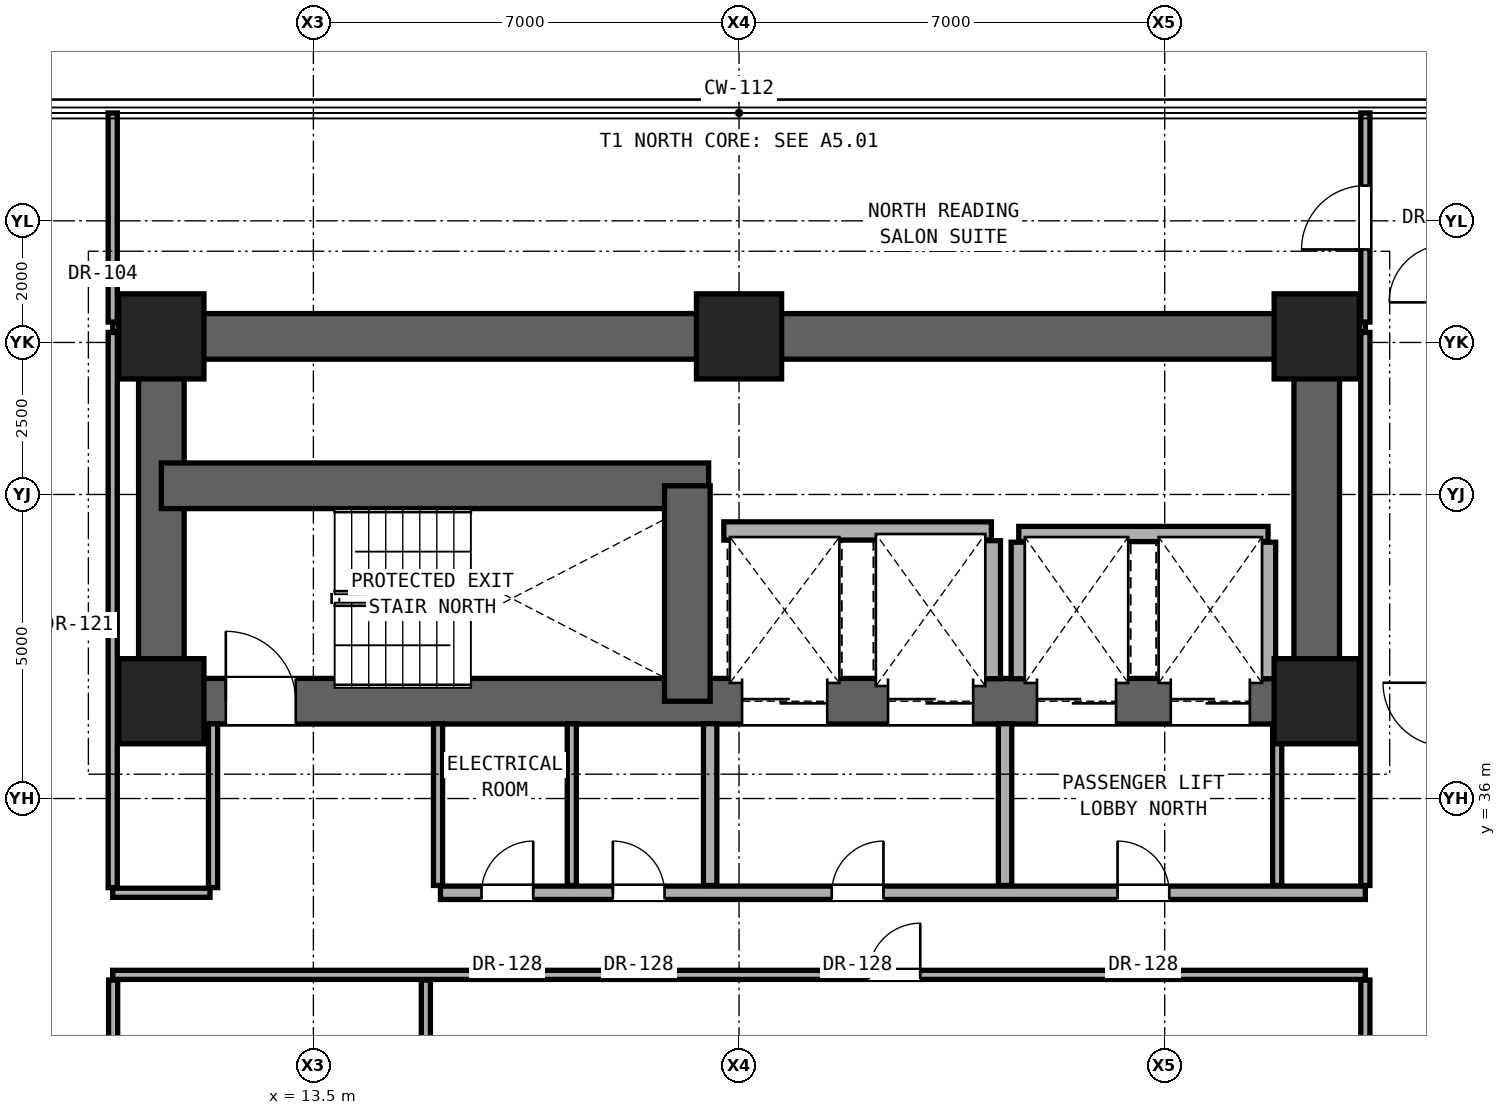
"""IFC4 building model, lengths in metres.
Left out: names, types, materials, properties, quantities, classifications, styles, units other than length and angle.
Written with IfcOpenShell. Run it as: python <this file> out.ifc"""

import sys

from ifc_helpers import new_model, si_unit, direction, frame, frame_2d, origin, origin_2d, place, context, subcontext, project, spatial, rectangle, extrude, element, fill, save


model = new_model("IFC4")
c1 = context("Model", 3, precision=1e-05, world=origin(), true_north=direction((0.0, 1.0)))
c2 = subcontext(c1, "Body", "Model", "MODEL_VIEW")
j1 = project(units=[si_unit("LENGTHUNIT", "METRE"), si_unit("PLANEANGLEUNIT", "RADIAN")], contexts=[c1])
p1 = place(None, origin())
s1 = spatial("IfcSite", under=j1, at=p1, CompositionType="ELEMENT")
p2 = place(p1, origin())
s2 = spatial("IfcBuilding", under=s1, at=p2, CompositionType="ELEMENT")
p3 = place(p2, frame((0.0, 0.0, 32.3)))
s3 = spatial("IfcBuildingStorey", under=s2, at=p3, CompositionType="ELEMENT", Elevation=32.3)
for number, where, z_axis, x_axis in (
    (1, (11.0, 37.6, 0.0), (0.0, 0.0, 1.0), (1.0, 0.0, 0.0)),
    (2, (30.0, 37.6, 0.0), (0.0, 0.0, 1.0), (1.0, 0.0, 0.0)),
    (3, (11.0, 43.6, 0.0), (0.0, 0.0, 1.0), (1.0, 0.0, 0.0)),
    (4, (20.5, 43.6, 0.0), (0.0, 0.0, 1.0), (1.0, 0.0, 0.0)),
    (5, (30.0, 43.6, 0.0), (0.0, 0.0, 1.0), (1.0, 0.0, 0.0)),
):
    element("IfcColumn", number, at=place(p3, frame(where, z_axis=z_axis, x_axis=x_axis)), inside=s3, PredefinedType="COLUMN", context=c2, shape_type="SweptSolid", body=[
        extrude(rectangle(XDim=1.4, YDim=1.4, at=origin_2d()), origin(), (0.0, 0.0, 1.0), 3.3),
    ])
p4 = place(p3, frame((11.0, 43.6, 0.0), z_axis=(0.0, 0.0, 1.0), x_axis=(1.0, 0.0, 0.0)))
e6 = element("IfcWall", 6, at=p4, inside=s3, PredefinedType="SHEAR", context=c2, shape_type="SweptSolid", body=[
    extrude(rectangle(XDim=19.0, YDim=0.75, at=frame_2d((9.5, 0.0))), origin(), (0.0, 0.0, 1.0), 3.06),
])
for number, where, z_axis, x_axis in (
    (7, (11.0, 37.6, 0.0), (0.0, 0.0, 1.0), (0.0, 1.0, 0.0)),
    (8, (30.0, 37.6, 0.0), (0.0, 0.0, 1.0), (0.0, 1.0, 0.0)),
):
    element("IfcWall", number, at=place(p3, frame(where, z_axis=z_axis, x_axis=x_axis)), inside=s3, PredefinedType="SHEAR", context=c2, shape_type="SweptSolid", body=[
        extrude(rectangle(XDim=6.0, YDim=0.75, at=frame_2d((3.0, 0.0))), origin(), (0.0, 0.0, 1.0), 3.06),
    ])
p5 = place(p3, frame((11.0, 37.6, 0.0), z_axis=(0.0, 0.0, 1.0), x_axis=(1.0, 0.0, 0.0)))
e9 = element("IfcWall", 9, at=p5, inside=s3, PredefinedType="SHEAR", context=c2, shape_type="SweptSolid", body=[
    extrude(rectangle(XDim=19.0, YDim=0.75, at=frame_2d((9.5, 0.0))), origin(), (0.0, 0.0, 1.0), 3.06),
])
p6 = place(p5, frame((1.06, 0.0, 0.0)))
e10 = element("IfcOpeningElement", 10, at=p6, cuts=e9, PredefinedType="OPENING", context=c2, shape_type="SweptSolid", body=[
    extrude(rectangle(XDim=1.15, YDim=2.2, at=frame_2d((0.575, 1.1))), frame((0.0, 0.385, 0.0), z_axis=(0.0, -1.0, 0.0), x_axis=(1.0, 0.0, 0.0)), (0.0, 0.0, 1.0), 0.77),
])
p7 = place(p5, frame((9.55, 0.0, 0.0)))
e11 = element("IfcOpeningElement", 11, at=p7, cuts=e9, PredefinedType="OPENING", context=c2, shape_type="SweptSolid", body=[
    extrude(rectangle(XDim=1.4, YDim=2.35, at=frame_2d((0.7, 1.175))), frame((0.0, 0.385, 0.0), z_axis=(0.0, -1.0, 0.0), x_axis=(1.0, 0.0, 0.0)), (0.0, 0.0, 1.0), 0.77),
])
p8 = place(p5, frame((11.95, 0.0, 0.0)))
e12 = element("IfcOpeningElement", 12, at=p8, cuts=e9, PredefinedType="OPENING", context=c2, shape_type="SweptSolid", body=[
    extrude(rectangle(XDim=1.4, YDim=2.35, at=frame_2d((0.7, 1.175))), frame((0.0, 0.385, 0.0), z_axis=(0.0, -1.0, 0.0), x_axis=(1.0, 0.0, 0.0)), (0.0, 0.0, 1.0), 0.77),
])
p9 = place(p5, frame((14.4, 0.0, 0.0)))
e13 = element("IfcOpeningElement", 13, at=p9, cuts=e9, PredefinedType="OPENING", context=c2, shape_type="SweptSolid", body=[
    extrude(rectangle(XDim=1.3, YDim=2.3, at=frame_2d((0.65, 1.15))), frame((0.0, 0.385, 0.0), z_axis=(0.0, -1.0, 0.0), x_axis=(1.0, 0.0, 0.0)), (0.0, 0.0, 1.0), 0.77),
])
p10 = place(p5, frame((16.6, 0.0, 0.0)))
e14 = element("IfcOpeningElement", 14, at=p10, cuts=e9, PredefinedType="OPENING", context=c2, shape_type="SweptSolid", body=[
    extrude(rectangle(XDim=1.3, YDim=2.3, at=frame_2d((0.65, 1.15))), frame((0.0, 0.385, 0.0), z_axis=(0.0, -1.0, 0.0), x_axis=(1.0, 0.0, 0.0)), (0.0, 0.0, 1.0), 0.77),
])
p11 = place(p3, frame((11.0, 41.143, 0.0), z_axis=(0.0, 0.0, 1.0), x_axis=(1.0, 0.0, 0.0)))
e15 = element("IfcWall", 15, at=p11, inside=s3, PredefinedType="SHEAR", context=c2, shape_type="SweptSolid", body=[
    extrude(rectangle(XDim=9.0, YDim=0.75, at=frame_2d((4.5, 0.0))), origin(), (0.0, 0.0, 1.0), 3.06),
])
p12 = place(p3, frame((19.65, 37.6, 0.0), z_axis=(0.0, 0.0, 1.0), x_axis=(0.0, 1.0, 0.0)))
e16 = element("IfcWall", 16, at=p12, inside=s3, PredefinedType="SHEAR", context=c2, shape_type="SweptSolid", body=[
    extrude(rectangle(XDim=3.543, YDim=0.75, at=frame_2d((1.771, 0.0))), origin(), (0.0, 0.0, 1.0), 3.06),
])
p13 = place(p3, frame((10.2, 33.1, 0.0), z_axis=(0.0, 0.0, 1.0), x_axis=(1.0, 0.0, 0.0)))
e17 = element("IfcWall", 17, at=p13, inside=s3, PredefinedType="PARTITIONING", context=c2, shape_type="SweptSolid", body=[
    extrude(rectangle(XDim=20.6, YDim=0.15, at=frame_2d((10.3, 0.0))), origin(), (0.0, 0.0, 1.0), 2.104),
])
p14 = place(p13, frame((12.43, 0.0, 0.0)))
e18 = element("IfcOpeningElement", 18, at=p14, cuts=e17, PredefinedType="OPENING", context=c2, shape_type="SweptSolid", body=[
    extrude(rectangle(XDim=0.85, YDim=2.01, at=frame_2d((0.425, 1.005))), frame((0.0, 0.085, 0.0), z_axis=(0.0, -1.0, 0.0), x_axis=(1.0, 0.0, 0.0)), (0.0, 0.0, 1.0), 0.17),
])
p15 = place(p3, frame((10.2, 34.45, 0.0), z_axis=(0.0, 0.0, 1.0), x_axis=(1.0, 0.0, 0.0)))
e19 = element("IfcWall", 19, at=p15, inside=s3, PredefinedType="PARTITIONING", context=c2, shape_type="SweptSolid", body=[
    extrude(rectangle(XDim=1.6, YDim=0.15, at=frame_2d((0.8, 0.0))), origin(), (0.0, 0.0, 1.0), 2.104),
])
p16 = place(p3, frame((15.59, 34.45, 0.0), z_axis=(0.0, 0.0, 1.0), x_axis=(1.0, 0.0, 0.0)))
e20 = element("IfcWall", 20, at=p16, inside=s3, PredefinedType="SOLIDWALL", context=c2, shape_type="SweptSolid", body=[
    extrude(rectangle(XDim=15.21, YDim=0.22, at=frame_2d((7.605, 0.0))), origin(), (0.0, 0.0, 1.0), 2.104),
])
p17 = place(p16, frame((6.435, 0.0, 0.0)))
e21 = element("IfcOpeningElement", 21, at=p17, cuts=e20, PredefinedType="OPENING", context=c2, shape_type="SweptSolid", body=[
    extrude(rectangle(XDim=0.85, YDim=2.01, at=frame_2d((0.425, 1.005))), frame((0.0, 0.12, 0.0), z_axis=(0.0, -1.0, 0.0), x_axis=(1.0, 0.0, 0.0)), (0.0, 0.0, 1.0), 0.24),
])
p18 = place(p16, frame((11.135, 0.0, 0.0)))
e22 = element("IfcOpeningElement", 22, at=p18, cuts=e20, PredefinedType="OPENING", context=c2, shape_type="SweptSolid", body=[
    extrude(rectangle(XDim=0.85, YDim=2.01, at=frame_2d((0.425, 1.005))), frame((0.0, 0.12, 0.0), z_axis=(0.0, -1.0, 0.0), x_axis=(1.0, 0.0, 0.0)), (0.0, 0.0, 1.0), 0.24),
])
p19 = place(p16, frame((0.675, 0.0, 0.0)))
e23 = element("IfcOpeningElement", 23, at=p19, cuts=e20, PredefinedType="OPENING", context=c2, shape_type="SweptSolid", body=[
    extrude(rectangle(XDim=0.85, YDim=2.01, at=frame_2d((0.425, 1.005))), frame((0.0, 0.12, 0.0), z_axis=(0.0, -1.0, 0.0), x_axis=(1.0, 0.0, 0.0)), (0.0, 0.0, 1.0), 0.24),
])
p20 = place(p16, frame((2.835, 0.0, 0.0)))
e24 = element("IfcOpeningElement", 24, at=p20, cuts=e20, PredefinedType="OPENING", context=c2, shape_type="SweptSolid", body=[
    extrude(rectangle(XDim=0.85, YDim=2.01, at=frame_2d((0.425, 1.005))), frame((0.0, 0.12, 0.0), z_axis=(0.0, -1.0, 0.0), x_axis=(1.0, 0.0, 0.0)), (0.0, 0.0, 1.0), 0.24),
])
p21 = place(p3, frame((25.1, 40.35, 0.0), z_axis=(0.0, 0.0, 1.0), x_axis=(1.0, 0.0, 0.0)))
e25 = element("IfcWall", 25, at=p21, inside=s3, PredefinedType="SOLIDWALL", context=c2, shape_type="SweptSolid", body=[
    extrude(rectangle(XDim=4.1, YDim=0.25, at=frame_2d((2.05, 0.0))), origin(), (0.0, 0.0, 1.0), 3.06),
])
p22 = place(p3, frame((20.25, 40.4, 0.0), z_axis=(0.0, 0.0, 1.0), x_axis=(1.0, 0.0, 0.0)))
e26 = element("IfcWall", 26, at=p22, inside=s3, PredefinedType="SOLIDWALL", context=c2, shape_type="SweptSolid", body=[
    extrude(rectangle(XDim=4.4, YDim=0.3, at=frame_2d((2.2, 0.0))), origin(), (0.0, 0.0, 1.0), 3.06),
])
for number, where, z_axis, x_axis in (
    (27, (10.2, 43.75, 0.0), (0.0, 0.0, 1.0), (1.0, 0.0, 0.0)),
    (28, (30.37, 43.75, 0.0), (0.0, 0.0, 1.0), (1.0, 0.0, 0.0)),
):
    element("IfcWall", number, at=place(p3, frame(where, z_axis=z_axis, x_axis=x_axis)), inside=s3, PredefinedType="PARTITIONING", context=c2, shape_type="SweptSolid", body=[
        extrude(rectangle(XDim=0.43, YDim=0.15, at=frame_2d((0.215, 0.0))), origin(), (0.0, 0.0, 1.0), 3.06),
    ])
p23 = place(p3, frame((10.207, 22.935, 0.0), z_axis=(0.0, 0.0, 1.0), x_axis=(0.0, 1.0, 0.0)))
e29 = element("IfcWall", 29, at=p23, inside=s3, PredefinedType="PARTITIONING", context=c2, shape_type="SweptSolid", body=[
    extrude(rectangle(XDim=10.08, YDim=0.15, at=frame_2d((5.04, 0.0))), origin(), (0.0, 0.0, 1.0), 2.279),
])
p24 = place(p23, frame((4.565, 0.0, 0.0)))
e30 = element("IfcOpeningElement", 30, at=p24, cuts=e29, PredefinedType="OPENING", context=c2, shape_type="SweptSolid", body=[
    extrude(rectangle(XDim=0.95, YDim=2.15, at=frame_2d((0.475, 1.075))), frame((0.0, 0.085, 0.0), z_axis=(0.0, -1.0, 0.0), x_axis=(1.0, 0.0, 0.0)), (0.0, 0.0, 1.0), 0.17),
])
p25 = place(p3, frame((10.2, 34.535, 0.0), z_axis=(0.0, 0.0, 1.0), x_axis=(0.0, 1.0, 0.0)))
e31 = element("IfcWall", 31, at=p25, inside=s3, PredefinedType="PARTITIONING", context=c2, shape_type="SweptSolid", body=[
    extrude(rectangle(XDim=9.13, YDim=0.15, at=frame_2d((4.565, 0.0))), origin(), (0.0, 0.0, 1.0), 2.436),
])
p26 = place(p3, frame((10.2, 43.835, 0.0), z_axis=(0.0, 0.0, 1.0), x_axis=(0.0, 1.0, 0.0)))
e32 = element("IfcWall", 32, at=p26, inside=s3, PredefinedType="PARTITIONING", context=c2, shape_type="SweptSolid", body=[
    extrude(rectangle(XDim=3.439, YDim=0.15, at=frame_2d((1.719, 0.0))), origin(), (0.0, 0.0, 1.0), 3.06),
])
p27 = place(p3, frame((11.85, 34.535, 0.0), z_axis=(0.0, 0.0, 1.0), x_axis=(0.0, 1.0, 0.0)))
e33 = element("IfcWall", 33, at=p27, inside=s3, PredefinedType="PARTITIONING", context=c2, shape_type="SweptSolid", body=[
    extrude(rectangle(XDim=2.695, YDim=0.15, at=frame_2d((1.348, 0.0))), origin(), (0.0, 0.0, 1.0), 3.06),
])
p28 = place(p3, frame((15.35, 27.113, 0.0), z_axis=(0.0, 0.0, 1.0), x_axis=(0.0, 1.0, 0.0)))
e34 = element("IfcWall", 34, at=p28, inside=s3, PredefinedType="PARTITIONING", context=c2, shape_type="SweptSolid", body=[
    extrude(rectangle(XDim=5.902, YDim=0.15, at=frame_2d((2.951, 0.0))), origin(), (0.0, 0.0, 1.0), 2.104),
])
p29 = place(p3, frame((15.55, 34.57, 0.0), z_axis=(0.0, 0.0, 1.0), x_axis=(0.0, 1.0, 0.0)))
e35 = element("IfcWall", 35, at=p29, inside=s3, PredefinedType="PARTITIONING", context=c2, shape_type="SweptSolid", body=[
    extrude(rectangle(XDim=2.66, YDim=0.15, at=frame_2d((1.33, 0.0))), origin(), (0.0, 0.0, 1.0), 2.589),
])
p30 = place(p3, frame((17.75, 34.57, 0.0), z_axis=(0.0, 0.0, 1.0), x_axis=(0.0, 1.0, 0.0)))
e36 = element("IfcWall", 36, at=p30, inside=s3, PredefinedType="PARTITIONING", context=c2, shape_type="SweptSolid", body=[
    extrude(rectangle(XDim=2.66, YDim=0.15, at=frame_2d((1.33, 0.0))), origin(), (0.0, 0.0, 1.0), 3.06),
])
p31 = place(p3, frame((20.025, 34.57, 0.0), z_axis=(0.0, 0.0, 1.0), x_axis=(0.0, 1.0, 0.0)))
e37 = element("IfcWall", 37, at=p31, inside=s3, PredefinedType="SOLIDWALL", context=c2, shape_type="SweptSolid", body=[
    extrude(rectangle(XDim=2.66, YDim=0.22, at=frame_2d((1.33, 0.0))), origin(), (0.0, 0.0, 1.0), 3.06),
])
p32 = place(p3, frame((24.65, 37.97, 0.0), z_axis=(0.0, 0.0, 1.0), x_axis=(0.0, 1.0, 0.0)))
e38 = element("IfcWall", 38, at=p32, inside=s3, PredefinedType="SOLIDWALL", context=c2, shape_type="SweptSolid", body=[
    extrude(rectangle(XDim=2.27, YDim=0.3, at=frame_2d((1.135, 0.0))), origin(), (0.0, 0.0, 1.0), 3.06),
])
p33 = place(p3, frame((24.875, 34.57, 0.0), z_axis=(0.0, 0.0, 1.0), x_axis=(0.0, 1.0, 0.0)))
e39 = element("IfcWall", 39, at=p33, inside=s3, PredefinedType="SOLIDWALL", context=c2, shape_type="SweptSolid", body=[
    extrude(rectangle(XDim=2.66, YDim=0.22, at=frame_2d((1.33, 0.0))), origin(), (0.0, 0.0, 1.0), 3.06),
])
p34 = place(p3, frame((25.1, 37.97, 0.0), z_axis=(0.0, 0.0, 1.0), x_axis=(0.0, 1.0, 0.0)))
e40 = element("IfcWall", 40, at=p34, inside=s3, PredefinedType="SOLIDWALL", context=c2, shape_type="SweptSolid", body=[
    extrude(rectangle(XDim=2.245, YDim=0.25, at=frame_2d((1.123, 0.0))), origin(), (0.0, 0.0, 1.0), 3.06),
])
p35 = place(p3, frame((29.35, 34.57, 0.0), z_axis=(0.0, 0.0, 1.0), x_axis=(0.0, 1.0, 0.0)))
e41 = element("IfcWall", 41, at=p35, inside=s3, PredefinedType="PARTITIONING", context=c2, shape_type="SweptSolid", body=[
    extrude(rectangle(XDim=2.66, YDim=0.15, at=frame_2d((1.33, 0.0))), origin(), (0.0, 0.0, 1.0), 3.06),
])
p36 = place(p3, frame((29.2, 37.97, 0.0), z_axis=(0.0, 0.0, 1.0), x_axis=(0.0, 1.0, 0.0)))
e42 = element("IfcWall", 42, at=p36, inside=s3, PredefinedType="SOLIDWALL", context=c2, shape_type="SweptSolid", body=[
    extrude(rectangle(XDim=2.245, YDim=0.25, at=frame_2d((1.123, 0.0))), origin(), (0.0, 0.0, 1.0), 3.06),
])
p37 = place(p3, frame((30.8, 27.113, 0.0), z_axis=(0.0, 0.0, 1.0), x_axis=(0.0, 1.0, 0.0)))
e43 = element("IfcWall", 43, at=p37, inside=s3, PredefinedType="PARTITIONING", context=c2, shape_type="SweptSolid", body=[
    extrude(rectangle(XDim=5.902, YDim=0.15, at=frame_2d((2.951, 0.0))), origin(), (0.0, 0.0, 1.0), 2.279),
])
p38 = place(p3, frame((30.8, 34.57, 0.0), z_axis=(0.0, 0.0, 1.0), x_axis=(0.0, 1.0, 0.0)))
e44 = element("IfcWall", 44, at=p38, inside=s3, PredefinedType="PARTITIONING", context=c2, shape_type="SweptSolid", body=[
    extrude(rectangle(XDim=9.095, YDim=0.15, at=frame_2d((4.547, 0.0))), origin(), (0.0, 0.0, 1.0), 2.436),
])
p39 = place(p3, frame((30.8, 43.835, 0.0), z_axis=(0.0, 0.0, 1.0), x_axis=(0.0, 1.0, 0.0)))
e45 = element("IfcWall", 45, at=p39, inside=s3, PredefinedType="PARTITIONING", context=c2, shape_type="SweptSolid", body=[
    extrude(rectangle(XDim=3.439, YDim=0.15, at=frame_2d((1.719, 0.0))), origin(), (0.0, 0.0, 1.0), 3.06),
])
p40 = place(p39, frame((1.195, 0.0, 0.0)))
e46 = element("IfcOpeningElement", 46, at=p40, cuts=e45, PredefinedType="OPENING", context=c2, shape_type="SweptSolid", body=[
    extrude(rectangle(XDim=1.05, YDim=2.2, at=frame_2d((0.525, 1.1))), frame((0.0, 0.085, 0.0), z_axis=(0.0, -1.0, 0.0), x_axis=(1.0, 0.0, 0.0)), (0.0, 0.0, 1.0), 0.17),
])
p41 = place(p6, origin())
e47 = element("IfcDoor", 47, at=p41, inside=s3, OperationType="SINGLE_SWING_LEFT", PredefinedType="DOOR", context=c2, shape_type="SweptSolid", body=[
    extrude(rectangle(XDim=1.15, YDim=2.2, at=frame_2d((0.575, 1.1))), frame((0.0, 0.025, 0.0), z_axis=(0.0, -1.0, 0.0), x_axis=(1.0, 0.0, 0.0)), (0.0, 0.0, 1.0), 0.05),
])
fill(e10, e47)
p42 = place(p17, origin())
e48 = element("IfcDoor", 48, at=p42, inside=s3, OperationType="SINGLE_SWING_RIGHT", PredefinedType="DOOR", context=c2, shape_type="SweptSolid", body=[
    extrude(rectangle(XDim=0.85, YDim=2.01, at=frame_2d((0.425, 1.005))), frame((0.0, 0.025, 0.0), z_axis=(0.0, -1.0, 0.0), x_axis=(1.0, 0.0, 0.0)), (0.0, 0.0, 1.0), 0.05),
])
fill(e21, e48)
p43 = place(p18, origin())
e49 = element("IfcDoor", 49, at=p43, inside=s3, OperationType="SINGLE_SWING_LEFT", PredefinedType="DOOR", context=c2, shape_type="SweptSolid", body=[
    extrude(rectangle(XDim=0.85, YDim=2.01, at=frame_2d((0.425, 1.005))), frame((0.0, 0.025, 0.0), z_axis=(0.0, -1.0, 0.0), x_axis=(1.0, 0.0, 0.0)), (0.0, 0.0, 1.0), 0.05),
])
fill(e22, e49)
p44 = place(p19, origin())
e50 = element("IfcDoor", 50, at=p44, inside=s3, OperationType="SINGLE_SWING_RIGHT", PredefinedType="DOOR", context=c2, shape_type="SweptSolid", body=[
    extrude(rectangle(XDim=0.85, YDim=2.01, at=frame_2d((0.425, 1.005))), frame((0.0, 0.025, 0.0), z_axis=(0.0, -1.0, 0.0), x_axis=(1.0, 0.0, 0.0)), (0.0, 0.0, 1.0), 0.05),
])
fill(e23, e50)
p45 = place(p20, origin())
e51 = element("IfcDoor", 51, at=p45, inside=s3, OperationType="SINGLE_SWING_LEFT", PredefinedType="DOOR", context=c2, shape_type="SweptSolid", body=[
    extrude(rectangle(XDim=0.85, YDim=2.01, at=frame_2d((0.425, 1.005))), frame((0.0, 0.025, 0.0), z_axis=(0.0, -1.0, 0.0), x_axis=(1.0, 0.0, 0.0)), (0.0, 0.0, 1.0), 0.05),
])
fill(e24, e51)
p46 = place(p14, origin())
e52 = element("IfcDoor", 52, at=p46, inside=s3, OperationType="SINGLE_SWING_RIGHT", PredefinedType="DOOR", context=c2, shape_type="SweptSolid", body=[
    extrude(rectangle(XDim=0.85, YDim=2.01, at=frame_2d((0.425, 1.005))), frame((0.0, 0.025, 0.0), z_axis=(0.0, -1.0, 0.0), x_axis=(1.0, 0.0, 0.0)), (0.0, 0.0, 1.0), 0.05),
])
fill(e18, e52)
p47 = place(p40, origin())
e53 = element("IfcDoor", 53, at=p47, inside=s3, OperationType="SINGLE_SWING_LEFT", PredefinedType="DOOR", context=c2, shape_type="SweptSolid", body=[
    extrude(rectangle(XDim=1.05, YDim=2.2, at=frame_2d((0.525, 1.1))), frame((0.0, 0.025, 0.0), z_axis=(0.0, -1.0, 0.0), x_axis=(1.0, 0.0, 0.0)), (0.0, 0.0, 1.0), 0.05),
])
fill(e46, e53)
p48 = place(p7, origin())
e54 = element("IfcDoor", 54, at=p48, inside=s3, OperationType="DOUBLE_DOOR_SLIDING", PredefinedType="DOOR", context=c2, shape_type="SweptSolid", body=[
    extrude(rectangle(XDim=1.4, YDim=2.35, at=frame_2d((0.7, 1.175))), frame((0.0, 0.025, 0.0), z_axis=(0.0, -1.0, 0.0), x_axis=(1.0, 0.0, 0.0)), (0.0, 0.0, 1.0), 0.05),
])
fill(e11, e54)
p49 = place(p8, origin())
e55 = element("IfcDoor", 55, at=p49, inside=s3, OperationType="DOUBLE_DOOR_SLIDING", PredefinedType="DOOR", context=c2, shape_type="SweptSolid", body=[
    extrude(rectangle(XDim=1.4, YDim=2.35, at=frame_2d((0.7, 1.175))), frame((0.0, 0.025, 0.0), z_axis=(0.0, -1.0, 0.0), x_axis=(1.0, 0.0, 0.0)), (0.0, 0.0, 1.0), 0.05),
])
fill(e12, e55)
p50 = place(p9, origin())
e56 = element("IfcDoor", 56, at=p50, inside=s3, OperationType="DOUBLE_DOOR_SLIDING", PredefinedType="DOOR", context=c2, shape_type="SweptSolid", body=[
    extrude(rectangle(XDim=1.3, YDim=2.3, at=frame_2d((0.65, 1.15))), frame((0.0, 0.025, 0.0), z_axis=(0.0, -1.0, 0.0), x_axis=(1.0, 0.0, 0.0)), (0.0, 0.0, 1.0), 0.05),
])
fill(e13, e56)
p51 = place(p10, origin())
e57 = element("IfcDoor", 57, at=p51, inside=s3, OperationType="DOUBLE_DOOR_SLIDING", PredefinedType="DOOR", context=c2, shape_type="SweptSolid", body=[
    extrude(rectangle(XDim=1.3, YDim=2.3, at=frame_2d((0.65, 1.15))), frame((0.0, 0.025, 0.0), z_axis=(0.0, -1.0, 0.0), x_axis=(1.0, 0.0, 0.0)), (0.0, 0.0, 1.0), 0.05),
])
fill(e14, e57)
save(model, sys.argv[1])
